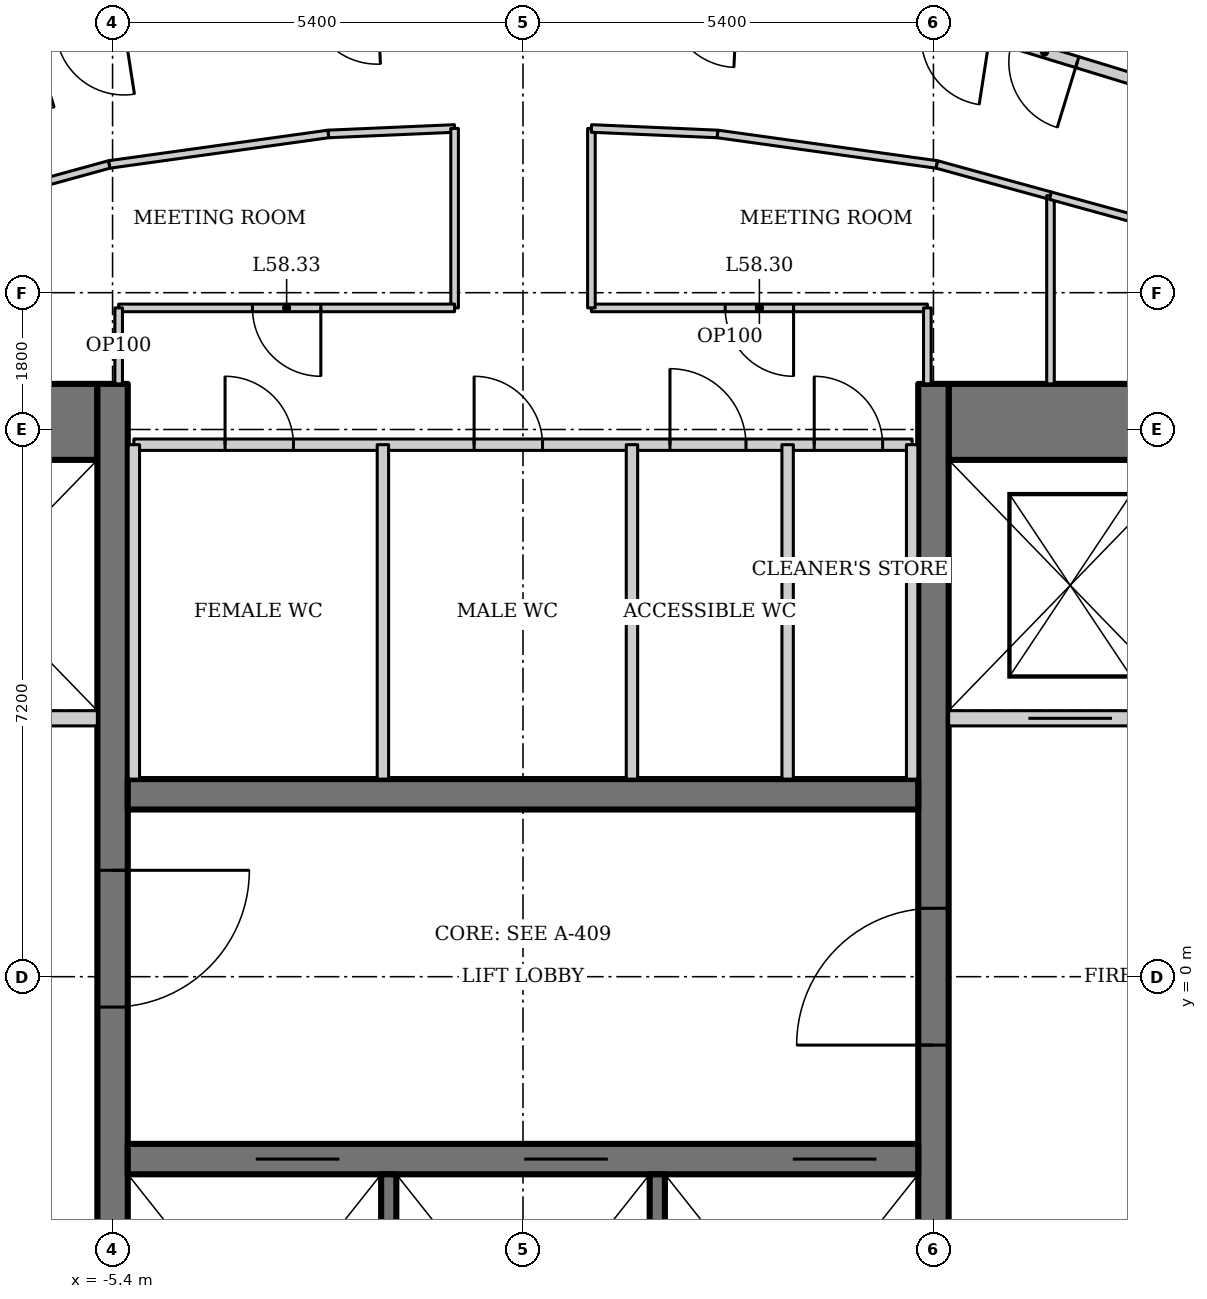
"""IFC4 building model, lengths in metres.
Left out: names, types, materials, properties, quantities, classifications, styles, units other than length and angle.
Written with IfcOpenShell. Run it as: python <this file> out.ifc"""

import sys

from ifc_helpers import new_model, si_unit, direction, frame, frame_2d, origin, place, context, subcontext, project, spatial, rectangle, extrude, element, fill, save


model = new_model("IFC4")
c1 = context("Model", 3, precision=1e-05, world=origin(), true_north=direction((0.0, 1.0)))
c2 = subcontext(c1, "Body", "Model", "MODEL_VIEW")
j1 = project(units=[si_unit("LENGTHUNIT", "METRE"), si_unit("PLANEANGLEUNIT", "RADIAN")], contexts=[c1])
p1 = place(None, origin())
s1 = spatial("IfcSite", under=j1, at=p1, CompositionType="ELEMENT")
p2 = place(p1, origin())
s2 = spatial("IfcBuilding", under=s1, at=p2, CompositionType="ELEMENT")
p3 = place(p2, frame((0.0, 0.0, 249.4)))
s3 = spatial("IfcBuildingStorey", under=s2, at=p3, CompositionType="ELEMENT", Elevation=249.4)
for number, where, z_axis, x_axis in (
    (1, (12.2, 7.3, 0.0), (0.0, 0.0, 1.0), (-1.0, 0.0, 0.0)),
    (2, (-5.6, 7.3, 0.0), (0.0, 0.0, 1.0), (-1.0, 0.0, 0.0)),
):
    element("IfcWall", number, at=place(p3, frame(where, z_axis=z_axis, x_axis=x_axis)), inside=s3, PredefinedType="SHEAR", context=c2, shape_type="SweptSolid", body=[
        extrude(rectangle(XDim=6.6, YDim=1.0, at=frame_2d((3.3, 0.0))), origin(), (0.0, 0.0, 1.0), 4.2),
    ])
p4 = place(p3, frame((5.4, -6.8, 0.0), z_axis=(0.0, 0.0, 1.0), x_axis=(0.0, 1.0, 0.0)))
e3 = element("IfcWall", 3, at=p4, inside=s3, PredefinedType="SHEAR", context=c2, shape_type="SweptSolid", body=[
    extrude(rectangle(XDim=14.6, YDim=0.4, at=frame_2d((7.3, 0.0))), origin(), (0.0, 0.0, 1.0), 4.2),
])
p5 = place(p4, frame((5.9, 0.0, 0.0)))
e4 = element("IfcOpeningElement", 4, at=p5, cuts=e3, PredefinedType="OPENING", context=c2, shape_type="SweptSolid", body=[
    extrude(rectangle(XDim=1.8, YDim=2.1, at=frame_2d((0.9, 1.05))), frame((0.0, 0.21, 0.0), z_axis=(0.0, -1.0, 0.0), x_axis=(1.0, 0.0, 0.0)), (0.0, 0.0, 1.0), 0.42),
])
p6 = place(p3, frame((-5.4, 7.8, 0.0), z_axis=(0.0, 0.0, 1.0), x_axis=(0.0, -1.0, 0.0)))
e5 = element("IfcWall", 5, at=p6, inside=s3, PredefinedType="SHEAR", context=c2, shape_type="SweptSolid", body=[
    extrude(rectangle(XDim=14.6, YDim=0.4, at=frame_2d((7.3, 0.0))), origin(), (0.0, 0.0, 1.0), 4.2),
])
p7 = place(p6, frame((6.4, 0.0, 0.0)))
e6 = element("IfcOpeningElement", 6, at=p7, cuts=e5, PredefinedType="OPENING", context=c2, shape_type="SweptSolid", body=[
    extrude(rectangle(XDim=1.8, YDim=2.1, at=frame_2d((0.9, 1.05))), frame((0.0, 0.21, 0.0), z_axis=(0.0, -1.0, 0.0), x_axis=(1.0, 0.0, 0.0)), (0.0, 0.0, 1.0), 0.42),
])
p8 = place(p3, frame((-5.2, -2.4, 0.0), z_axis=(0.0, 0.0, 1.0), x_axis=(1.0, 0.0, 0.0)))
e7 = element("IfcWall", 7, at=p8, inside=s3, PredefinedType="SHEAR", context=c2, shape_type="SweptSolid", body=[
    extrude(rectangle(XDim=10.4, YDim=0.4, at=frame_2d((5.2, 0.0))), origin(), (0.0, 0.0, 1.0), 4.2),
])
p9 = place(p8, frame((1.683, 0.0, 0.0)))
e8 = element("IfcOpeningElement", 8, at=p9, cuts=e7, PredefinedType="OPENING", context=c2, shape_type="SweptSolid", body=[
    extrude(rectangle(XDim=1.1, YDim=2.2, at=frame_2d((0.55, 1.1))), frame((0.0, 0.21, 0.0), z_axis=(0.0, -1.0, 0.0), x_axis=(1.0, 0.0, 0.0)), (0.0, 0.0, 1.0), 0.42),
])
p10 = place(p8, frame((5.217, 0.0, 0.0)))
e9 = element("IfcOpeningElement", 9, at=p10, cuts=e7, PredefinedType="OPENING", context=c2, shape_type="SweptSolid", body=[
    extrude(rectangle(XDim=1.1, YDim=2.2, at=frame_2d((0.55, 1.1))), frame((0.0, 0.21, 0.0), z_axis=(0.0, -1.0, 0.0), x_axis=(1.0, 0.0, 0.0)), (0.0, 0.0, 1.0), 0.42),
])
p11 = place(p8, frame((8.75, 0.0, 0.0)))
e10 = element("IfcOpeningElement", 10, at=p11, cuts=e7, PredefinedType="OPENING", context=c2, shape_type="SweptSolid", body=[
    extrude(rectangle(XDim=1.1, YDim=2.2, at=frame_2d((0.55, 1.1))), frame((0.0, 0.21, 0.0), z_axis=(0.0, -1.0, 0.0), x_axis=(1.0, 0.0, 0.0)), (0.0, 0.0, 1.0), 0.42),
])
for number, where, z_axis, x_axis in (
    (11, (-1.767, -2.6, 0.0), (0.0, 0.0, 1.0), (0.0, -1.0, 0.0)),
    (12, (1.767, -2.6, 0.0), (0.0, 0.0, 1.0), (0.0, -1.0, 0.0)),
):
    element("IfcWall", number, at=place(p3, frame(where, z_axis=z_axis, x_axis=x_axis)), inside=s3, PredefinedType="SOLIDWALL", context=c2, shape_type="SweptSolid", body=[
        extrude(rectangle(XDim=4.2, YDim=0.2, at=frame_2d((2.1, 0.0))), origin(), (0.0, 0.0, 1.0), 4.2),
    ])
p12 = place(p3, frame((5.2, 2.4, 0.0), z_axis=(0.0, 0.0, 1.0), x_axis=(-1.0, 0.0, 0.0)))
e13 = element("IfcWall", 13, at=p12, inside=s3, PredefinedType="SHEAR", context=c2, shape_type="SweptSolid", body=[
    extrude(rectangle(XDim=10.4, YDim=0.4, at=frame_2d((5.2, 0.0))), origin(), (0.0, 0.0, 1.0), 4.2),
])
p13 = place(p3, frame((12.2, 3.4, 0.0), z_axis=(0.0, 0.0, 1.0), x_axis=(-1.0, 0.0, 0.0)))
e14 = element("IfcWall", 14, at=p13, inside=s3, PredefinedType="SOLIDWALL", context=c2, shape_type="SweptSolid", body=[
    extrude(rectangle(XDim=6.6, YDim=0.2, at=frame_2d((3.3, 0.0))), origin(), (0.0, 0.0, 1.0), 4.2),
])
p14 = place(p13, frame((4.45, 0.0, 0.0)))
e15 = element("IfcOpeningElement", 15, at=p14, cuts=e14, PredefinedType="OPENING", context=c2, shape_type="SweptSolid", body=[
    extrude(rectangle(XDim=1.1, YDim=2.2, at=frame_2d((0.55, 1.1))), frame((0.0, 0.11, 0.0), z_axis=(0.0, -1.0, 0.0), x_axis=(1.0, 0.0, 0.0)), (0.0, 0.0, 1.0), 0.22),
])
p15 = place(p13, frame((0.9, 0.0, 0.0)))
e16 = element("IfcOpeningElement", 16, at=p15, cuts=e14, PredefinedType="OPENING", context=c2, shape_type="SweptSolid", body=[
    extrude(rectangle(XDim=1.4, YDim=2.2, at=frame_2d((0.7, 1.1))), frame((0.0, 0.11, 0.0), z_axis=(0.0, -1.0, 0.0), x_axis=(1.0, 0.0, 0.0)), (0.0, 0.0, 1.0), 0.22),
])
p16 = place(p3, frame((-12.2, 3.4, 0.0), z_axis=(0.0, 0.0, 1.0), x_axis=(1.0, 0.0, 0.0)))
e17 = element("IfcWall", 17, at=p16, inside=s3, PredefinedType="SOLIDWALL", context=c2, shape_type="SweptSolid", body=[
    extrude(rectangle(XDim=6.6, YDim=0.2, at=frame_2d((3.3, 0.0))), origin(), (0.0, 0.0, 1.0), 4.2),
])
p17 = place(p16, frame((1.05, 0.0, 0.0)))
e18 = element("IfcOpeningElement", 18, at=p17, cuts=e17, PredefinedType="OPENING", context=c2, shape_type="SweptSolid", body=[
    extrude(rectangle(XDim=1.1, YDim=2.2, at=frame_2d((0.55, 1.1))), frame((0.0, 0.11, 0.0), z_axis=(0.0, -1.0, 0.0), x_axis=(1.0, 0.0, 0.0)), (0.0, 0.0, 1.0), 0.22),
])
p18 = place(p16, frame((4.3, 0.0, 0.0)))
e19 = element("IfcOpeningElement", 19, at=p18, cuts=e17, PredefinedType="OPENING", context=c2, shape_type="SweptSolid", body=[
    extrude(rectangle(XDim=1.4, YDim=2.2, at=frame_2d((0.7, 1.1))), frame((0.0, 0.11, 0.0), z_axis=(0.0, -1.0, 0.0), x_axis=(1.0, 0.0, 0.0)), (0.0, 0.0, 1.0), 0.22),
])
p19 = place(p3, frame((10.633, 11.01, 0.0), z_axis=(0.0, 0.0, 1.0), x_axis=(-0.956185837153, 0.292760388079, 0.0)))
e20 = element("IfcWall", 20, at=p19, inside=s3, PredefinedType="PARTITIONING", context=c2, shape_type="SweptSolid", body=[
    extrude(rectangle(XDim=4.544, YDim=0.15, at=frame_2d((2.272, 0.0))), origin(), (0.0, 0.0, 1.0), 4.05),
])
p20 = place(p19, frame((3.494, 0.0, 0.0)))
e21 = element("IfcOpeningElement", 21, at=p20, cuts=e20, PredefinedType="OPENING", context=c2, shape_type="SweptSolid", body=[
    extrude(rectangle(XDim=0.9, YDim=2.1, at=frame_2d((0.45, 1.05))), frame((0.0, 0.085, 0.0), z_axis=(0.0, -1.0, 0.0), x_axis=(1.0, 0.0, 0.0)), (0.0, 0.0, 1.0), 0.17),
])
p21 = place(p3, frame((-5.12, 7.0, 0.0), z_axis=(0.0, 0.0, 1.0), x_axis=(1.0, 0.0, 0.0)))
e22 = element("IfcWall", 22, at=p21, inside=s3, PredefinedType="SOLIDWALL", context=c2, shape_type="SweptSolid", body=[
    extrude(rectangle(XDim=10.24, YDim=0.15, at=frame_2d((5.12, 0.0))), origin(), (0.0, 0.0, 1.0), 4.05),
])
p22 = place(p21, frame((1.2, 0.0, 0.0)))
e23 = element("IfcOpeningElement", 23, at=p22, cuts=e22, PredefinedType="OPENING", context=c2, shape_type="SweptSolid", body=[
    extrude(rectangle(XDim=0.9, YDim=2.1, at=frame_2d((0.45, 1.05))), frame((0.0, 0.085, 0.0), z_axis=(0.0, -1.0, 0.0), x_axis=(1.0, 0.0, 0.0)), (0.0, 0.0, 1.0), 0.17),
])
p23 = place(p21, frame((4.477, 0.0, 0.0)))
e24 = element("IfcOpeningElement", 24, at=p23, cuts=e22, PredefinedType="OPENING", context=c2, shape_type="SweptSolid", body=[
    extrude(rectangle(XDim=0.9, YDim=2.1, at=frame_2d((0.45, 1.05))), frame((0.0, 0.085, 0.0), z_axis=(0.0, -1.0, 0.0), x_axis=(1.0, 0.0, 0.0)), (0.0, 0.0, 1.0), 0.17),
])
p24 = place(p21, frame((7.054, 0.0, 0.0)))
e25 = element("IfcOpeningElement", 25, at=p24, cuts=e22, PredefinedType="OPENING", context=c2, shape_type="SweptSolid", body=[
    extrude(rectangle(XDim=1.0, YDim=2.1, at=frame_2d((0.5, 1.05))), frame((0.0, 0.085, 0.0), z_axis=(0.0, -1.0, 0.0), x_axis=(1.0, 0.0, 0.0)), (0.0, 0.0, 1.0), 0.17),
])
p25 = place(p21, frame((8.952, 0.0, 0.0)))
e26 = element("IfcOpeningElement", 26, at=p25, cuts=e22, PredefinedType="OPENING", context=c2, shape_type="SweptSolid", body=[
    extrude(rectangle(XDim=0.9, YDim=2.1, at=frame_2d((0.45, 1.05))), frame((0.0, 0.085, 0.0), z_axis=(0.0, -1.0, 0.0), x_axis=(1.0, 0.0, 0.0)), (0.0, 0.0, 1.0), 0.17),
])
for number, where, z_axis, x_axis in (
    (27, (-5.12, 2.6, 0.0), (0.0, 0.0, 1.0), (0.0, 1.0, 0.0)),
    (28, (5.12, 2.6, 0.0), (0.0, 0.0, 1.0), (0.0, 1.0, 0.0)),
    (29, (-1.843, 2.6, 0.0), (0.0, 0.0, 1.0), (0.0, 1.0, 0.0)),
):
    element("IfcWall", number, at=place(p3, frame(where, z_axis=z_axis, x_axis=x_axis)), inside=s3, PredefinedType="SOLIDWALL", context=c2, shape_type="SweptSolid", body=[
        extrude(rectangle(XDim=4.4, YDim=0.15, at=frame_2d((2.2, 0.0))), origin(), (0.0, 0.0, 1.0), 4.05),
    ])
p26 = place(p3, frame((1.434, 2.6, 0.0), z_axis=(0.0, 0.0, 1.0), x_axis=(0.0, 1.0, 0.0)))
e30 = element("IfcWall", 30, at=p26, inside=s3, PredefinedType="SOLIDWALL", context=c2, shape_type="SweptSolid", body=[
    extrude(rectangle(XDim=4.4, YDim=0.15, at=frame_2d((2.2, 0.0))), origin(), (0.0, 0.0, 1.0), 3.108),
])
p27 = place(p3, frame((3.482, 2.6, 0.0), z_axis=(0.0, 0.0, 1.0), x_axis=(0.0, 1.0, 0.0)))
e31 = element("IfcWall", 31, at=p27, inside=s3, PredefinedType="SOLIDWALL", context=c2, shape_type="SweptSolid", body=[
    extrude(rectangle(XDim=4.4, YDim=0.15, at=frame_2d((2.2, 0.0))), origin(), (0.0, 0.0, 1.0), 4.05),
])
p28 = place(p3, frame((5.32, 8.8, 0.0), z_axis=(0.0, 0.0, 1.0), x_axis=(-1.0, 0.0, 0.0)))
e32 = element("IfcWall", 32, at=p28, inside=s3, PredefinedType="PARTITIONING", context=c2, shape_type="SweptSolid", body=[
    extrude(rectangle(XDim=4.42, YDim=0.1, at=frame_2d((2.21, 0.0))), origin(), (0.0, 0.0, 1.0), 4.05),
])
p29 = place(p28, frame((1.76, 0.0, 0.0)))
e33 = element("IfcOpeningElement", 33, at=p29, cuts=e32, PredefinedType="OPENING", context=c2, shape_type="SweptSolid", body=[
    extrude(rectangle(XDim=0.9, YDim=2.1, at=frame_2d((0.45, 1.05))), frame((0.0, 0.06, 0.0), z_axis=(0.0, -1.0, 0.0), x_axis=(1.0, 0.0, 0.0)), (0.0, 0.0, 1.0), 0.12),
])
p30 = place(p3, frame((0.9, 8.8, 0.0), z_axis=(0.0, 0.0, 1.0), x_axis=(0.0, 1.0, 0.0)))
e34 = element("IfcWall", 34, at=p30, inside=s3, PredefinedType="PARTITIONING", context=c2, shape_type="SweptSolid", body=[
    extrude(rectangle(XDim=2.361, YDim=0.1, at=frame_2d((1.18, 0.0))), origin(), (0.0, 0.0, 1.0), 4.05),
])
p31 = place(p3, frame((0.9, 11.161, 0.0), z_axis=(0.0, 0.0, 1.0), x_axis=(0.999053939397, -0.043488230303, 0.0)))
e35 = element("IfcWall", 35, at=p31, inside=s3, PredefinedType="PARTITIONING", context=c2, shape_type="SweptSolid", body=[
    extrude(rectangle(XDim=1.662, YDim=0.1, at=frame_2d((0.831, 0.0))), origin(), (0.0, 0.0, 1.0), 4.05),
])
p32 = place(p3, frame((2.56, 11.089, 0.0), z_axis=(0.0, 0.0, 1.0), x_axis=(0.99045099049, -0.137865280027, 0.0)))
e36 = element("IfcWall", 36, at=p32, inside=s3, PredefinedType="PARTITIONING", context=c2, shape_type="SweptSolid", body=[
    extrude(rectangle(XDim=2.913, YDim=0.1, at=frame_2d((1.457, 0.0))), origin(), (0.0, 0.0, 1.0), 4.05),
])
p33 = place(p3, frame((5.445, 10.687, 0.0), z_axis=(0.0, 0.0, 1.0), x_axis=(0.964227536736, -0.265075946476, 0.0)))
e37 = element("IfcWall", 37, at=p33, inside=s3, PredefinedType="PARTITIONING", context=c2, shape_type="SweptSolid", body=[
    extrude(rectangle(XDim=1.55, YDim=0.1, at=frame_2d((0.775, 0.0))), origin(), (0.0, 0.0, 1.0), 4.05),
])
p34 = place(p3, frame((6.94, 10.276, 0.0), z_axis=(0.0, 0.0, 1.0), x_axis=(0.0, -1.0, 0.0)))
e38 = element("IfcWall", 38, at=p34, inside=s3, PredefinedType="PARTITIONING", context=c2, shape_type="SweptSolid", body=[
    extrude(rectangle(XDim=2.476, YDim=0.1, at=frame_2d((1.238, 0.0))), origin(), (0.0, 0.0, 1.0), 4.05),
])
p35 = place(p3, frame((5.32, 7.8, 0.0), z_axis=(0.0, 0.0, 1.0), x_axis=(0.0, 1.0, 0.0)))
e39 = element("IfcWall", 39, at=p35, inside=s3, PredefinedType="PARTITIONING", context=c2, shape_type="SweptSolid", body=[
    extrude(rectangle(XDim=1.0, YDim=0.1, at=frame_2d((0.5, 0.0))), origin(), (0.0, 0.0, 1.0), 4.05),
])
p36 = place(p3, frame((6.94, 10.276, 0.0), z_axis=(0.0, 0.0, 1.0), x_axis=(0.964255150805, -0.264975478385, 0.0)))
e40 = element("IfcWall", 40, at=p36, inside=s3, PredefinedType="PARTITIONING", context=c2, shape_type="SweptSolid", body=[
    extrude(rectangle(XDim=2.445, YDim=0.1, at=frame_2d((1.223, 0.0))), origin(), (0.0, 0.0, 1.0), 4.05),
])
p37 = place(p3, frame((-5.445, 10.687, 0.0), z_axis=(0.0, 0.0, 1.0), x_axis=(0.99045099049, 0.137865280027, 0.0)))
e41 = element("IfcWall", 41, at=p37, inside=s3, PredefinedType="PARTITIONING", context=c2, shape_type="SweptSolid", body=[
    extrude(rectangle(XDim=2.913, YDim=0.1, at=frame_2d((1.457, 0.0))), origin(), (0.0, 0.0, 1.0), 4.05),
])
p38 = place(p3, frame((-2.56, 11.089, 0.0), z_axis=(0.0, 0.0, 1.0), x_axis=(0.999053939397, 0.043488230303, 0.0)))
e42 = element("IfcWall", 42, at=p38, inside=s3, PredefinedType="PARTITIONING", context=c2, shape_type="SweptSolid", body=[
    extrude(rectangle(XDim=1.662, YDim=0.1, at=frame_2d((0.831, 0.0))), origin(), (0.0, 0.0, 1.0), 4.05),
])
p39 = place(p3, frame((-0.9, 11.161, 0.0), z_axis=(0.0, 0.0, 1.0), x_axis=(0.0, -1.0, 0.0)))
e43 = element("IfcWall", 43, at=p39, inside=s3, PredefinedType="PARTITIONING", context=c2, shape_type="SweptSolid", body=[
    extrude(rectangle(XDim=2.361, YDim=0.1, at=frame_2d((1.18, 0.0))), origin(), (0.0, 0.0, 1.0), 4.05),
])
p40 = place(p3, frame((-0.9, 8.8, 0.0), z_axis=(0.0, 0.0, 1.0), x_axis=(-1.0, 0.0, 0.0)))
e44 = element("IfcWall", 44, at=p40, inside=s3, PredefinedType="PARTITIONING", context=c2, shape_type="SweptSolid", body=[
    extrude(rectangle(XDim=4.42, YDim=0.1, at=frame_2d((2.21, 0.0))), origin(), (0.0, 0.0, 1.0), 4.05),
])
p41 = place(p40, frame((1.76, 0.0, 0.0)))
e45 = element("IfcOpeningElement", 45, at=p41, cuts=e44, PredefinedType="OPENING", context=c2, shape_type="SweptSolid", body=[
    extrude(rectangle(XDim=0.9, YDim=2.1, at=frame_2d((0.45, 1.05))), frame((0.0, 0.06, 0.0), z_axis=(0.0, -1.0, 0.0), x_axis=(1.0, 0.0, 0.0)), (0.0, 0.0, 1.0), 0.12),
])
p42 = place(p3, frame((-5.32, 8.8, 0.0), z_axis=(0.0, 0.0, 1.0), x_axis=(0.0, -1.0, 0.0)))
e46 = element("IfcWall", 46, at=p42, inside=s3, PredefinedType="PARTITIONING", context=c2, shape_type="SweptSolid", body=[
    extrude(rectangle(XDim=1.0, YDim=0.1, at=frame_2d((0.5, 0.0))), origin(), (0.0, 0.0, 1.0), 4.05),
])
p43 = place(p3, frame((-6.94, 10.276, 0.0), z_axis=(0.0, 0.0, 1.0), x_axis=(0.964227536736, 0.265075946476, 0.0)))
e47 = element("IfcWall", 47, at=p43, inside=s3, PredefinedType="PARTITIONING", context=c2, shape_type="SweptSolid", body=[
    extrude(rectangle(XDim=1.55, YDim=0.1, at=frame_2d((0.775, 0.0))), origin(), (0.0, 0.0, 1.0), 4.05),
])
p44 = place(p5, origin())
e48 = element("IfcDoor", 48, at=p44, inside=s3, OperationType="DOUBLE_DOOR_DOUBLE_SWING", PredefinedType="DOOR", context=c2, shape_type="SweptSolid", body=[
    extrude(rectangle(XDim=1.8, YDim=2.1, at=frame_2d((0.9, 1.05))), frame((0.0, 0.025, 0.0), z_axis=(0.0, -1.0, 0.0), x_axis=(1.0, 0.0, 0.0)), (0.0, 0.0, 1.0), 0.05),
])
fill(e4, e48)
p45 = place(p7, origin())
e49 = element("IfcDoor", 49, at=p45, inside=s3, OperationType="DOUBLE_DOOR_DOUBLE_SWING", PredefinedType="DOOR", context=c2, shape_type="SweptSolid", body=[
    extrude(rectangle(XDim=1.8, YDim=2.1, at=frame_2d((0.9, 1.05))), frame((0.0, 0.025, 0.0), z_axis=(0.0, -1.0, 0.0), x_axis=(1.0, 0.0, 0.0)), (0.0, 0.0, 1.0), 0.05),
])
fill(e6, e49)
p46 = place(p9, origin())
e50 = element("IfcDoor", 50, at=p46, inside=s3, OperationType="DOUBLE_DOOR_SLIDING", PredefinedType="DOOR", context=c2, shape_type="SweptSolid", body=[
    extrude(rectangle(XDim=1.1, YDim=2.2, at=frame_2d((0.55, 1.1))), frame((0.0, 0.025, 0.0), z_axis=(0.0, -1.0, 0.0), x_axis=(1.0, 0.0, 0.0)), (0.0, 0.0, 1.0), 0.05),
])
fill(e8, e50)
p47 = place(p10, origin())
e51 = element("IfcDoor", 51, at=p47, inside=s3, OperationType="DOUBLE_DOOR_SLIDING", PredefinedType="DOOR", context=c2, shape_type="SweptSolid", body=[
    extrude(rectangle(XDim=1.1, YDim=2.2, at=frame_2d((0.55, 1.1))), frame((0.0, 0.025, 0.0), z_axis=(0.0, -1.0, 0.0), x_axis=(1.0, 0.0, 0.0)), (0.0, 0.0, 1.0), 0.05),
])
fill(e9, e51)
p48 = place(p11, origin())
e52 = element("IfcDoor", 52, at=p48, inside=s3, OperationType="DOUBLE_DOOR_SLIDING", PredefinedType="DOOR", context=c2, shape_type="SweptSolid", body=[
    extrude(rectangle(XDim=1.1, YDim=2.2, at=frame_2d((0.55, 1.1))), frame((0.0, 0.025, 0.0), z_axis=(0.0, -1.0, 0.0), x_axis=(1.0, 0.0, 0.0)), (0.0, 0.0, 1.0), 0.05),
])
fill(e10, e52)
p49 = place(p14, origin())
e53 = element("IfcDoor", 53, at=p49, inside=s3, OperationType="DOUBLE_DOOR_SLIDING", PredefinedType="DOOR", context=c2, shape_type="SweptSolid", body=[
    extrude(rectangle(XDim=1.1, YDim=2.2, at=frame_2d((0.55, 1.1))), frame((0.0, 0.025, 0.0), z_axis=(0.0, -1.0, 0.0), x_axis=(1.0, 0.0, 0.0)), (0.0, 0.0, 1.0), 0.05),
])
fill(e15, e53)
p50 = place(p22, origin())
e54 = element("IfcDoor", 54, at=p50, inside=s3, OperationType="SINGLE_SWING_LEFT", PredefinedType="DOOR", context=c2, shape_type="SweptSolid", body=[
    extrude(rectangle(XDim=0.9, YDim=2.1, at=frame_2d((0.45, 1.05))), frame((0.0, 0.025, 0.0), z_axis=(0.0, -1.0, 0.0), x_axis=(1.0, 0.0, 0.0)), (0.0, 0.0, 1.0), 0.05),
])
fill(e23, e54)
p51 = place(p23, origin())
e55 = element("IfcDoor", 55, at=p51, inside=s3, OperationType="SINGLE_SWING_LEFT", PredefinedType="DOOR", context=c2, shape_type="SweptSolid", body=[
    extrude(rectangle(XDim=0.9, YDim=2.1, at=frame_2d((0.45, 1.05))), frame((0.0, 0.025, 0.0), z_axis=(0.0, -1.0, 0.0), x_axis=(1.0, 0.0, 0.0)), (0.0, 0.0, 1.0), 0.05),
])
fill(e24, e55)
p52 = place(p24, origin())
e56 = element("IfcDoor", 56, at=p52, inside=s3, OperationType="SINGLE_SWING_LEFT", PredefinedType="DOOR", context=c2, shape_type="SweptSolid", body=[
    extrude(rectangle(XDim=1.0, YDim=2.1, at=frame_2d((0.5, 1.05))), frame((0.0, 0.025, 0.0), z_axis=(0.0, -1.0, 0.0), x_axis=(1.0, 0.0, 0.0)), (0.0, 0.0, 1.0), 0.05),
])
fill(e25, e56)
p53 = place(p25, origin())
e57 = element("IfcDoor", 57, at=p53, inside=s3, OperationType="SINGLE_SWING_LEFT", PredefinedType="DOOR", context=c2, shape_type="SweptSolid", body=[
    extrude(rectangle(XDim=0.9, YDim=2.1, at=frame_2d((0.45, 1.05))), frame((0.0, 0.025, 0.0), z_axis=(0.0, -1.0, 0.0), x_axis=(1.0, 0.0, 0.0)), (0.0, 0.0, 1.0), 0.05),
])
fill(e26, e57)
p54 = place(p29, origin())
e58 = element("IfcDoor", 58, at=p54, inside=s3, OperationType="SINGLE_SWING_LEFT", PredefinedType="DOOR", context=c2, shape_type="SweptSolid", body=[
    extrude(rectangle(XDim=0.9, YDim=2.1, at=frame_2d((0.45, 1.05))), frame((0.0, 0.025, 0.0), z_axis=(0.0, -1.0, 0.0), x_axis=(1.0, 0.0, 0.0)), (0.0, 0.0, 1.0), 0.05),
])
fill(e33, e58)
p55 = place(p41, origin())
e59 = element("IfcDoor", 59, at=p55, inside=s3, OperationType="SINGLE_SWING_LEFT", PredefinedType="DOOR", context=c2, shape_type="SweptSolid", body=[
    extrude(rectangle(XDim=0.9, YDim=2.1, at=frame_2d((0.45, 1.05))), frame((0.0, 0.025, 0.0), z_axis=(0.0, -1.0, 0.0), x_axis=(1.0, 0.0, 0.0)), (0.0, 0.0, 1.0), 0.05),
])
fill(e45, e59)
p56 = place(p20, origin())
e60 = element("IfcDoor", 60, at=p56, inside=s3, OperationType="SINGLE_SWING_LEFT", PredefinedType="DOOR", context=c2, shape_type="SweptSolid", body=[
    extrude(rectangle(XDim=0.9, YDim=2.1, at=frame_2d((0.45, 1.05))), frame((0.0, 0.025, 0.0), z_axis=(0.0, -1.0, 0.0), x_axis=(1.0, 0.0, 0.0)), (0.0, 0.0, 1.0), 0.05),
])
fill(e21, e60)
save(model, sys.argv[1])
